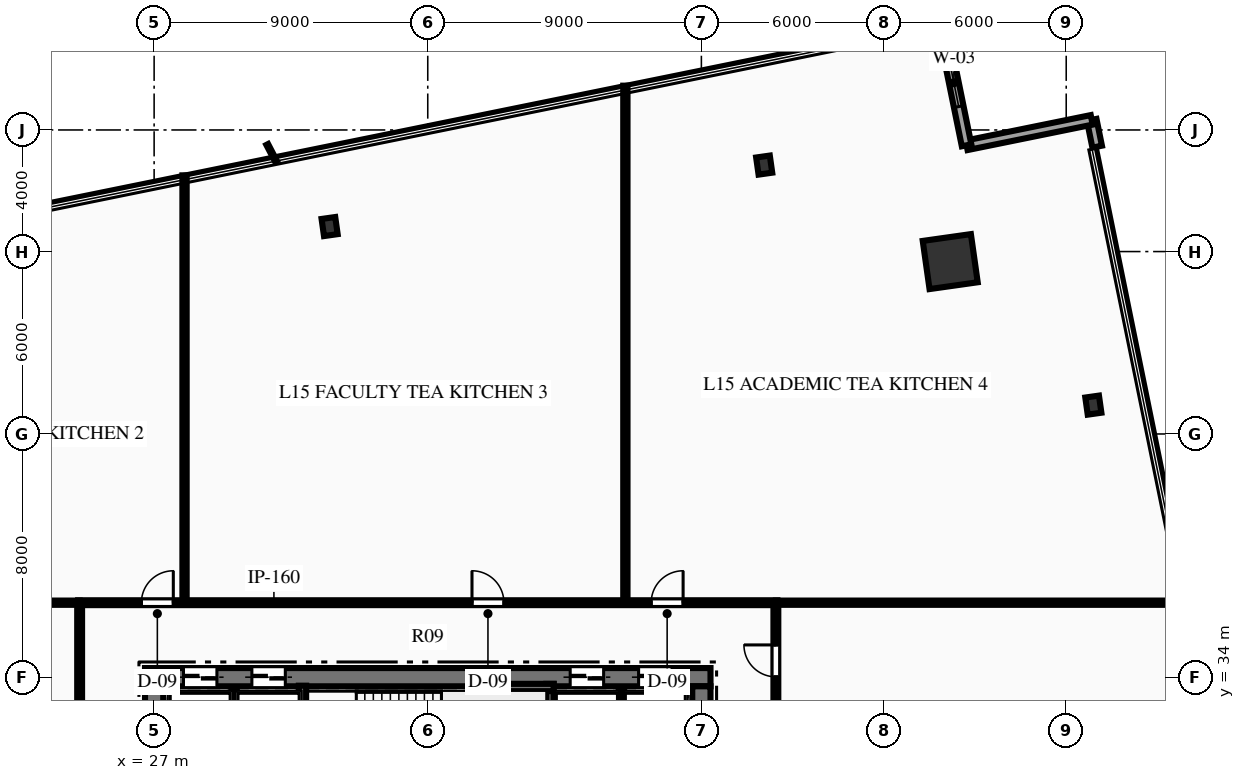
"""IFC4 building model, lengths in metres.
Left out: names, types, materials, properties, quantities, classifications, styles, units other than length and angle.
Written with IfcOpenShell. Run it as: python <this file> out.ifc"""

import sys

from ifc_helpers import new_model, si_unit, direction, frame, frame_2d, origin, origin_2d, place, context, subcontext, project, spatial, rectangle, hollow_rectangle, i_section, extrude, element, fill, save


model = new_model("IFC4")
c1 = context("Model", 3, precision=1e-05, world=origin(), true_north=direction((0.0, 1.0)))
c2 = subcontext(c1, "Body", "Model", "MODEL_VIEW")
j1 = project(units=[si_unit("LENGTHUNIT", "METRE"), si_unit("PLANEANGLEUNIT", "RADIAN")], contexts=[c1])
p1 = place(None, origin())
s1 = spatial("IfcSite", under=j1, at=p1, CompositionType="ELEMENT")
p2 = place(p1, origin())
s2 = spatial("IfcBuilding", under=s1, at=p2, CompositionType="ELEMENT")
p3 = place(p2, frame((0.0, 0.0, 66.45)))
s3 = spatial("IfcBuildingStorey", under=s2, at=p3, CompositionType="ELEMENT", Elevation=66.45)
p4 = place(p3, frame((26.7, 34.0, 0.0), z_axis=(0.0, 0.0, 1.0), x_axis=(1.0, 0.0, 0.0)))
e1 = element("IfcWall", 1, at=p4, inside=s3, PredefinedType="SHEAR", context=c2, shape_type="SweptSolid", body=[
    extrude(rectangle(XDim=18.6, YDim=0.6, at=frame_2d((9.3, 0.0))), origin(), (0.0, 0.0, 1.0), 3.75),
])
p5 = place(p4, frame((1.265, 0.0, 0.0)))
e2 = element("IfcOpeningElement", 2, at=p5, cuts=e1, PredefinedType="OPENING", context=c2, shape_type="SweptSolid", body=[
    extrude(rectangle(XDim=1.1, YDim=2.15, at=frame_2d((0.55, 1.075))), frame((0.0, 0.31, 0.0), z_axis=(0.0, -1.0, 0.0), x_axis=(1.0, 0.0, 0.0)), (0.0, 0.0, 1.0), 0.62),
])
p6 = place(p4, frame((3.515, 0.0, 0.0)))
e3 = element("IfcOpeningElement", 3, at=p6, cuts=e1, PredefinedType="OPENING", context=c2, shape_type="SweptSolid", body=[
    extrude(rectangle(XDim=1.1, YDim=2.15, at=frame_2d((0.55, 1.075))), frame((0.0, 0.31, 0.0), z_axis=(0.0, -1.0, 0.0), x_axis=(1.0, 0.0, 0.0)), (0.0, 0.0, 1.0), 0.62),
])
p7 = place(p4, frame((13.985, 0.0, 0.0)))
e4 = element("IfcOpeningElement", 4, at=p7, cuts=e1, PredefinedType="OPENING", context=c2, shape_type="SweptSolid", body=[
    extrude(rectangle(XDim=1.1, YDim=2.15, at=frame_2d((0.55, 1.075))), frame((0.0, 0.31, 0.0), z_axis=(0.0, -1.0, 0.0), x_axis=(1.0, 0.0, 0.0)), (0.0, 0.0, 1.0), 0.62),
])
p8 = place(p4, frame((16.235, 0.0, 0.0)))
e5 = element("IfcOpeningElement", 5, at=p8, cuts=e1, PredefinedType="OPENING", context=c2, shape_type="SweptSolid", body=[
    extrude(rectangle(XDim=1.1, YDim=2.15, at=frame_2d((0.55, 1.075))), frame((0.0, 0.31, 0.0), z_axis=(0.0, -1.0, 0.0), x_axis=(1.0, 0.0, 0.0)), (0.0, 0.0, 1.0), 0.62),
])
p9 = place(p3, frame((27.0, 18.3, 0.0), z_axis=(0.0, 0.0, 1.0), x_axis=(0.0, 1.0, 0.0)))
e6 = element("IfcWall", 6, at=p9, inside=s3, PredefinedType="SHEAR", context=c2, shape_type="SweptSolid", body=[
    extrude(rectangle(XDim=15.4, YDim=0.6, at=frame_2d((7.7, 0.0))), origin(), (0.0, 0.0, 1.0), 3.75),
])
p10 = place(p9, frame((9.94, 0.0, 0.0)))
e7 = element("IfcOpeningElement", 7, at=p10, cuts=e6, PredefinedType="OPENING", context=c2, shape_type="SweptSolid", body=[
    extrude(rectangle(XDim=1.4, YDim=2.2, at=frame_2d((0.7, 1.1))), frame((0.0, 0.31, 0.0), z_axis=(0.0, -1.0, 0.0), x_axis=(1.0, 0.0, 0.0)), (0.0, 0.0, 1.0), 0.62),
])
p11 = place(p3, frame((45.0, 18.3, 0.0), z_axis=(0.0, 0.0, 1.0), x_axis=(0.0, 1.0, 0.0)))
e8 = element("IfcWall", 8, at=p11, inside=s3, PredefinedType="SHEAR", context=c2, shape_type="SweptSolid", body=[
    extrude(rectangle(XDim=15.4, YDim=0.6, at=frame_2d((7.7, 0.0))), origin(), (0.0, 0.0, 1.0), 3.75),
])
p12 = place(p11, frame((9.94, 0.0, 0.0)))
e9 = element("IfcOpeningElement", 9, at=p12, cuts=e8, PredefinedType="OPENING", context=c2, shape_type="SweptSolid", body=[
    extrude(rectangle(XDim=1.4, YDim=2.2, at=frame_2d((0.7, 1.1))), frame((0.0, 0.31, 0.0), z_axis=(0.0, -1.0, 0.0), x_axis=(1.0, 0.0, 0.0)), (0.0, 0.0, 1.0), 0.62),
])
p13 = place(p3, frame((31.88, 29.93, 0.0), z_axis=(0.0, 0.0, 1.0), x_axis=(0.0, 1.0, 0.0)))
e10 = element("IfcWall", 10, at=p13, inside=s3, PredefinedType="SHEAR", context=c2, shape_type="SweptSolid", body=[
    extrude(rectangle(XDim=3.79, YDim=0.24, at=frame_2d((1.895, 0.0))), origin(), (0.0, 0.0, 1.0), 3.75),
])
p14 = place(p3, frame((40.02, 29.93, 0.0), z_axis=(0.0, 0.0, 1.0), x_axis=(0.0, 1.0, 0.0)))
e11 = element("IfcWall", 11, at=p14, inside=s3, PredefinedType="SHEAR", context=c2, shape_type="SweptSolid", body=[
    extrude(rectangle(XDim=3.85, YDim=0.24, at=frame_2d((1.925, 0.0))), origin(), (0.0, 0.0, 1.0), 3.75),
])
p15 = place(p3, frame((37.85, 33.66, 0.0), z_axis=(0.0, 0.0, 1.0), x_axis=(1.0, 0.0, 0.0)))
e12 = element("IfcWall", 12, at=p15, inside=s3, PredefinedType="SHEAR", context=c2, shape_type="SweptSolid", body=[
    extrude(rectangle(XDim=2.29, YDim=0.24, at=frame_2d((1.145, 0.0))), origin(), (0.0, 0.0, 1.0), 3.75),
])
p16 = place(p3, frame((53.185, 47.67, 0.0), z_axis=(0.0, 0.0, 1.0), x_axis=(0.990146240249, 0.140037219771, 0.0)))
e13 = element("IfcColumn", 13, at=p16, inside=s3, PredefinedType="COLUMN", context=c2, shape_type="SweptSolid", body=[
    extrude(hollow_rectangle(XDim=1.6, YDim=1.6, WallThickness=0.08, at=origin_2d()), origin(), (0.0, 0.0, 1.0), 3.75),
])
for number, where, z_axis, x_axis in (
    (14, (57.892, 42.949, 0.0), (0.0, 0.0, 1.0), (0.99, 0.14, 0.0)),
    (15, (47.066, 50.844, 0.0), (0.0, 0.0, 1.0), (0.99, 0.14, 0.0)),
    (16, (32.772, 48.823, 0.0), (0.0, 0.0, 1.0), (0.99, 0.14, 0.0)),
):
    element("IfcColumn", number, at=place(p3, frame(where, z_axis=z_axis, x_axis=x_axis)), inside=s3, PredefinedType="COLUMN", context=c2, shape_type="SweptSolid", body=[
        extrude(i_section(OverallWidth=0.454, OverallDepth=0.569, WebThickness=0.078, FlangeThickness=0.125, at=origin_2d()), origin(), (0.0, 0.0, 1.0), 3.75),
    ])
p17 = place(p3, frame((57.839, 52.333, 0.0), z_axis=(0.0, 0.0, 1.0), x_axis=(0.199401877541, -0.979917798202, 0.0)))
e17 = element("IfcWall", 17, at=p17, inside=s3, PredefinedType="STANDARD", context=c2, shape_type="SweptSolid", body=[
    extrude(rectangle(XDim=0.9, YDim=0.32, at=frame_2d((0.45, 0.0))), origin(), (0.0, 0.0, 1.0), 3.44),
])
p18 = place(p3, frame((53.723, 51.495, 0.0), z_axis=(0.0, 0.0, 1.0), x_axis=(0.979922420409, 0.199379161348, 0.0)))
e18 = element("IfcWall", 18, at=p18, inside=s3, PredefinedType="STANDARD", context=c2, shape_type="SweptSolid", body=[
    extrude(rectangle(XDim=4.2, YDim=0.32, at=frame_2d((2.1, 0.0))), origin(), (0.0, 0.0, 1.0), 3.44),
])
p19 = place(p3, frame((52.885, 55.611, 0.0), z_axis=(0.0, 0.0, 1.0), x_axis=(0.199379161348, -0.979922420409, 0.0)))
e19 = element("IfcWall", 19, at=p19, inside=s3, PredefinedType="STANDARD", context=c2, shape_type="SweptSolid", body=[
    extrude(rectangle(XDim=4.2, YDim=0.32, at=frame_2d((2.1, 0.0))), origin(), (0.0, 0.0, 1.0), 3.44),
])
p20 = place(p19, frame((1.3, 0.0, 0.85)))
e20 = element("IfcOpeningElement", 20, at=p20, cuts=e19, PredefinedType="OPENING", context=c2, shape_type="SweptSolid", body=[
    extrude(rectangle(XDim=1.6, YDim=2.1, at=frame_2d((0.8, 1.05))), frame((0.0, 0.17, 0.0), z_axis=(0.0, -1.0, 0.0), x_axis=(1.0, 0.0, 0.0)), (0.0, 0.0, 1.0), 0.34),
])
for number, where, z_axis, x_axis in (
    (21, (29.63, 29.9, 0.0), (0.0, 0.0, 1.0), (0.0, 1.0, 0.0)),
    (22, (42.37, 29.9, 0.0), (0.0, 0.0, 1.0), (0.0, 1.0, 0.0)),
):
    element("IfcWall", number, at=place(p3, frame(where, z_axis=z_axis, x_axis=x_axis)), inside=s3, PredefinedType="PARTITIONING", context=c2, shape_type="SweptSolid", body=[
        extrude(rectangle(XDim=3.75, YDim=0.18, at=frame_2d((1.875, 0.0))), origin(), (0.0, 0.0, 1.0), 3.44),
    ])
p21 = place(p3, frame((24.5, 36.45, 0.0), z_axis=(0.0, 0.0, 1.0), x_axis=(1.0, 0.0, 0.0)))
e23 = element("IfcWall", 23, at=p21, inside=s3, PredefinedType="PARTITIONING", context=c2, shape_type="SweptSolid", body=[
    extrude(rectangle(XDim=23.0, YDim=0.16, at=frame_2d((11.5, 0.0))), origin(), (0.0, 0.0, 1.0), 3.44),
])
p22 = place(p21, frame((2.081, 0.0, 0.0)))
e24 = element("IfcOpeningElement", 24, at=p22, cuts=e23, PredefinedType="OPENING", context=c2, shape_type="SweptSolid", body=[
    extrude(rectangle(XDim=1.05, YDim=2.15, at=frame_2d((0.525, 1.075))), frame((0.0, 0.09, 0.0), z_axis=(0.0, -1.0, 0.0), x_axis=(1.0, 0.0, 0.0)), (0.0, 0.0, 1.0), 0.18),
])
p23 = place(p21, frame((12.955, 0.0, 0.0)))
e25 = element("IfcOpeningElement", 25, at=p23, cuts=e23, PredefinedType="OPENING", context=c2, shape_type="SweptSolid", body=[
    extrude(rectangle(XDim=1.05, YDim=2.15, at=frame_2d((0.525, 1.075))), frame((0.0, 0.09, 0.0), z_axis=(0.0, -1.0, 0.0), x_axis=(1.0, 0.0, 0.0)), (0.0, 0.0, 1.0), 0.18),
])
p24 = place(p21, frame((18.849, 0.0, 0.0)))
e26 = element("IfcOpeningElement", 26, at=p24, cuts=e23, PredefinedType="OPENING", context=c2, shape_type="SweptSolid", body=[
    extrude(rectangle(XDim=1.05, YDim=2.15, at=frame_2d((0.525, 1.075))), frame((0.0, 0.09, 0.0), z_axis=(0.0, -1.0, 0.0), x_axis=(1.0, 0.0, 0.0)), (0.0, 0.0, 1.0), 0.18),
])
p25 = place(p3, frame((24.55, 15.55, 0.0), z_axis=(0.0, 0.0, 1.0), x_axis=(0.0, 1.0, 0.0)))
e27 = element("IfcWall", 27, at=p25, inside=s3, PredefinedType="PARTITIONING", context=c2, shape_type="SweptSolid", body=[
    extrude(rectangle(XDim=20.9, YDim=0.16, at=frame_2d((10.45, 0.0))), origin(), (0.0, 0.0, 1.0), 3.44),
])
p26 = place(p25, frame((3.405, 0.0, 0.0)))
e28 = element("IfcOpeningElement", 28, at=p26, cuts=e27, PredefinedType="OPENING", context=c2, shape_type="SweptSolid", body=[
    extrude(rectangle(XDim=1.05, YDim=2.15, at=frame_2d((0.525, 1.075))), frame((0.0, 0.09, 0.0), z_axis=(0.0, -1.0, 0.0), x_axis=(1.0, 0.0, 0.0)), (0.0, 0.0, 1.0), 0.18),
])
p27 = place(p25, frame((15.734, 0.0, 0.0)))
e29 = element("IfcOpeningElement", 29, at=p27, cuts=e27, PredefinedType="OPENING", context=c2, shape_type="SweptSolid", body=[
    extrude(rectangle(XDim=1.05, YDim=2.15, at=frame_2d((0.525, 1.075))), frame((0.0, 0.09, 0.0), z_axis=(0.0, -1.0, 0.0), x_axis=(1.0, 0.0, 0.0)), (0.0, 0.0, 1.0), 0.18),
])
p28 = place(p3, frame((47.45, 15.55, 0.0), z_axis=(0.0, 0.0, 1.0), x_axis=(0.0, 1.0, 0.0)))
e30 = element("IfcWall", 30, at=p28, inside=s3, PredefinedType="PARTITIONING", context=c2, shape_type="SweptSolid", body=[
    extrude(rectangle(XDim=20.9, YDim=0.16, at=frame_2d((10.45, 0.0))), origin(), (0.0, 0.0, 1.0), 3.44),
])
p29 = place(p28, frame((2.727, 0.0, 0.0)))
e31 = element("IfcOpeningElement", 31, at=p29, cuts=e30, PredefinedType="OPENING", context=c2, shape_type="SweptSolid", body=[
    extrude(rectangle(XDim=1.05, YDim=2.15, at=frame_2d((0.525, 1.075))), frame((0.0, 0.09, 0.0), z_axis=(0.0, -1.0, 0.0), x_axis=(1.0, 0.0, 0.0)), (0.0, 0.0, 1.0), 0.18),
])
p30 = place(p28, frame((5.469, 0.0, 0.0)))
e32 = element("IfcOpeningElement", 32, at=p30, cuts=e30, PredefinedType="OPENING", context=c2, shape_type="SweptSolid", body=[
    extrude(rectangle(XDim=1.05, YDim=2.15, at=frame_2d((0.525, 1.075))), frame((0.0, 0.09, 0.0), z_axis=(0.0, -1.0, 0.0), x_axis=(1.0, 0.0, 0.0)), (0.0, 0.0, 1.0), 0.18),
])
p31 = place(p28, frame((10.797, 0.0, 0.0)))
e33 = element("IfcOpeningElement", 33, at=p31, cuts=e30, PredefinedType="OPENING", context=c2, shape_type="SweptSolid", body=[
    extrude(rectangle(XDim=1.05, YDim=2.15, at=frame_2d((0.525, 1.075))), frame((0.0, 0.09, 0.0), z_axis=(0.0, -1.0, 0.0), x_axis=(1.0, 0.0, 0.0)), (0.0, 0.0, 1.0), 0.18),
])
p32 = place(p28, frame((18.461, 0.0, 0.0)))
e34 = element("IfcOpeningElement", 34, at=p32, cuts=e30, PredefinedType="OPENING", context=c2, shape_type="SweptSolid", body=[
    extrude(rectangle(XDim=1.05, YDim=2.15, at=frame_2d((0.525, 1.075))), frame((0.0, 0.09, 0.0), z_axis=(0.0, -1.0, 0.0), x_axis=(1.0, 0.0, 0.0)), (0.0, 0.0, 1.0), 0.18),
])
p33 = place(p3, frame((6.719, 36.45, 0.0), z_axis=(0.0, 0.0, 1.0), x_axis=(1.0, 0.0, 0.0)))
e35 = element("IfcWall", 35, at=p33, inside=s3, PredefinedType="PARTITIONING", context=c2, shape_type="SweptSolid", body=[
    extrude(rectangle(XDim=17.831, YDim=0.14, at=frame_2d((8.916, 0.0))), origin(), (0.0, 0.0, 1.0), 2.972),
])
p34 = place(p3, frame((47.45, 36.45, 0.0), z_axis=(0.0, 0.0, 1.0), x_axis=(1.0, 0.0, 0.0)))
e36 = element("IfcWall", 36, at=p34, inside=s3, PredefinedType="PARTITIONING", context=c2, shape_type="SweptSolid", body=[
    extrude(rectangle(XDim=13.579, YDim=0.14, at=frame_2d((6.79, 0.0))), origin(), (0.0, 0.0, 1.0), 3.44),
])
p35 = place(p3, frame((28.0, 36.45, 0.0), z_axis=(0.0, 0.0, 1.0), x_axis=(0.0, 1.0, 0.0)))
e37 = element("IfcWall", 37, at=p35, inside=s3, PredefinedType="PARTITIONING", context=c2, shape_type="SweptSolid", body=[
    extrude(rectangle(XDim=14.057, YDim=0.14, at=frame_2d((7.029, 0.0))), origin(), (0.0, 0.0, 1.0), 3.44),
])
p36 = place(p3, frame((42.5, 36.45, 0.0), z_axis=(0.0, 0.0, 1.0), x_axis=(0.0, 1.0, 0.0)))
e38 = element("IfcWall", 38, at=p36, inside=s3, PredefinedType="PARTITIONING", context=c2, shape_type="SweptSolid", body=[
    extrude(rectangle(XDim=17.007, YDim=0.14, at=frame_2d((8.503, 0.0))), origin(), (0.0, 0.0, 1.0), 3.44),
])
p37 = place(p20, origin())
e39 = element("IfcWindow", 39, at=p37, inside=s3, PartitioningType="SINGLE_PANEL", PredefinedType="WINDOW", context=c2, shape_type="SweptSolid", body=[
    extrude(rectangle(XDim=1.6, YDim=2.1, at=frame_2d((0.8, 1.05))), frame((0.0, 0.03, 0.0), z_axis=(0.0, -1.0, 0.0), x_axis=(1.0, 0.0, 0.0)), (0.0, 0.0, 1.0), 0.06),
])
fill(e20, e39)
p38 = place(p22, origin())
e40 = element("IfcDoor", 40, at=p38, inside=s3, OperationType="SINGLE_SWING_RIGHT", PredefinedType="DOOR", context=c2, shape_type="SweptSolid", body=[
    extrude(rectangle(XDim=1.05, YDim=2.15, at=frame_2d((0.525, 1.075))), frame((0.0, 0.025, 0.0), z_axis=(0.0, -1.0, 0.0), x_axis=(1.0, 0.0, 0.0)), (0.0, 0.0, 1.0), 0.05),
])
fill(e24, e40)
p39 = place(p23, origin())
e41 = element("IfcDoor", 41, at=p39, inside=s3, OperationType="SINGLE_SWING_LEFT", PredefinedType="DOOR", context=c2, shape_type="SweptSolid", body=[
    extrude(rectangle(XDim=1.05, YDim=2.15, at=frame_2d((0.525, 1.075))), frame((0.0, 0.025, 0.0), z_axis=(0.0, -1.0, 0.0), x_axis=(1.0, 0.0, 0.0)), (0.0, 0.0, 1.0), 0.05),
])
fill(e25, e41)
p40 = place(p24, origin())
e42 = element("IfcDoor", 42, at=p40, inside=s3, OperationType="SINGLE_SWING_RIGHT", PredefinedType="DOOR", context=c2, shape_type="SweptSolid", body=[
    extrude(rectangle(XDim=1.05, YDim=2.15, at=frame_2d((0.525, 1.075))), frame((0.0, 0.025, 0.0), z_axis=(0.0, -1.0, 0.0), x_axis=(1.0, 0.0, 0.0)), (0.0, 0.0, 1.0), 0.05),
])
fill(e26, e42)
p41 = place(p32, origin())
e43 = element("IfcDoor", 43, at=p41, inside=s3, OperationType="SINGLE_SWING_RIGHT", PredefinedType="DOOR", context=c2, shape_type="SweptSolid", body=[
    extrude(rectangle(XDim=1.05, YDim=2.15, at=frame_2d((0.525, 1.075))), frame((0.0, 0.025, 0.0), z_axis=(0.0, -1.0, 0.0), x_axis=(1.0, 0.0, 0.0)), (0.0, 0.0, 1.0), 0.05),
])
fill(e34, e43)
p42 = place(p5, origin())
e44 = element("IfcDoor", 44, at=p42, inside=s3, OperationType="SLIDING_TO_LEFT", PredefinedType="DOOR", context=c2, shape_type="SweptSolid", body=[
    extrude(rectangle(XDim=1.1, YDim=2.15, at=frame_2d((0.55, 1.075))), frame((0.0, 0.025, 0.0), z_axis=(0.0, -1.0, 0.0), x_axis=(1.0, 0.0, 0.0)), (0.0, 0.0, 1.0), 0.05),
])
fill(e2, e44)
p43 = place(p6, origin())
e45 = element("IfcDoor", 45, at=p43, inside=s3, OperationType="SLIDING_TO_LEFT", PredefinedType="DOOR", context=c2, shape_type="SweptSolid", body=[
    extrude(rectangle(XDim=1.1, YDim=2.15, at=frame_2d((0.55, 1.075))), frame((0.0, 0.025, 0.0), z_axis=(0.0, -1.0, 0.0), x_axis=(1.0, 0.0, 0.0)), (0.0, 0.0, 1.0), 0.05),
])
fill(e3, e45)
p44 = place(p7, origin())
e46 = element("IfcDoor", 46, at=p44, inside=s3, OperationType="SLIDING_TO_LEFT", PredefinedType="DOOR", context=c2, shape_type="SweptSolid", body=[
    extrude(rectangle(XDim=1.1, YDim=2.15, at=frame_2d((0.55, 1.075))), frame((0.0, 0.025, 0.0), z_axis=(0.0, -1.0, 0.0), x_axis=(1.0, 0.0, 0.0)), (0.0, 0.0, 1.0), 0.05),
])
fill(e4, e46)
p45 = place(p8, origin())
e47 = element("IfcDoor", 47, at=p45, inside=s3, OperationType="SLIDING_TO_LEFT", PredefinedType="DOOR", context=c2, shape_type="SweptSolid", body=[
    extrude(rectangle(XDim=1.1, YDim=2.15, at=frame_2d((0.55, 1.075))), frame((0.0, 0.025, 0.0), z_axis=(0.0, -1.0, 0.0), x_axis=(1.0, 0.0, 0.0)), (0.0, 0.0, 1.0), 0.05),
])
fill(e5, e47)
save(model, sys.argv[1])
